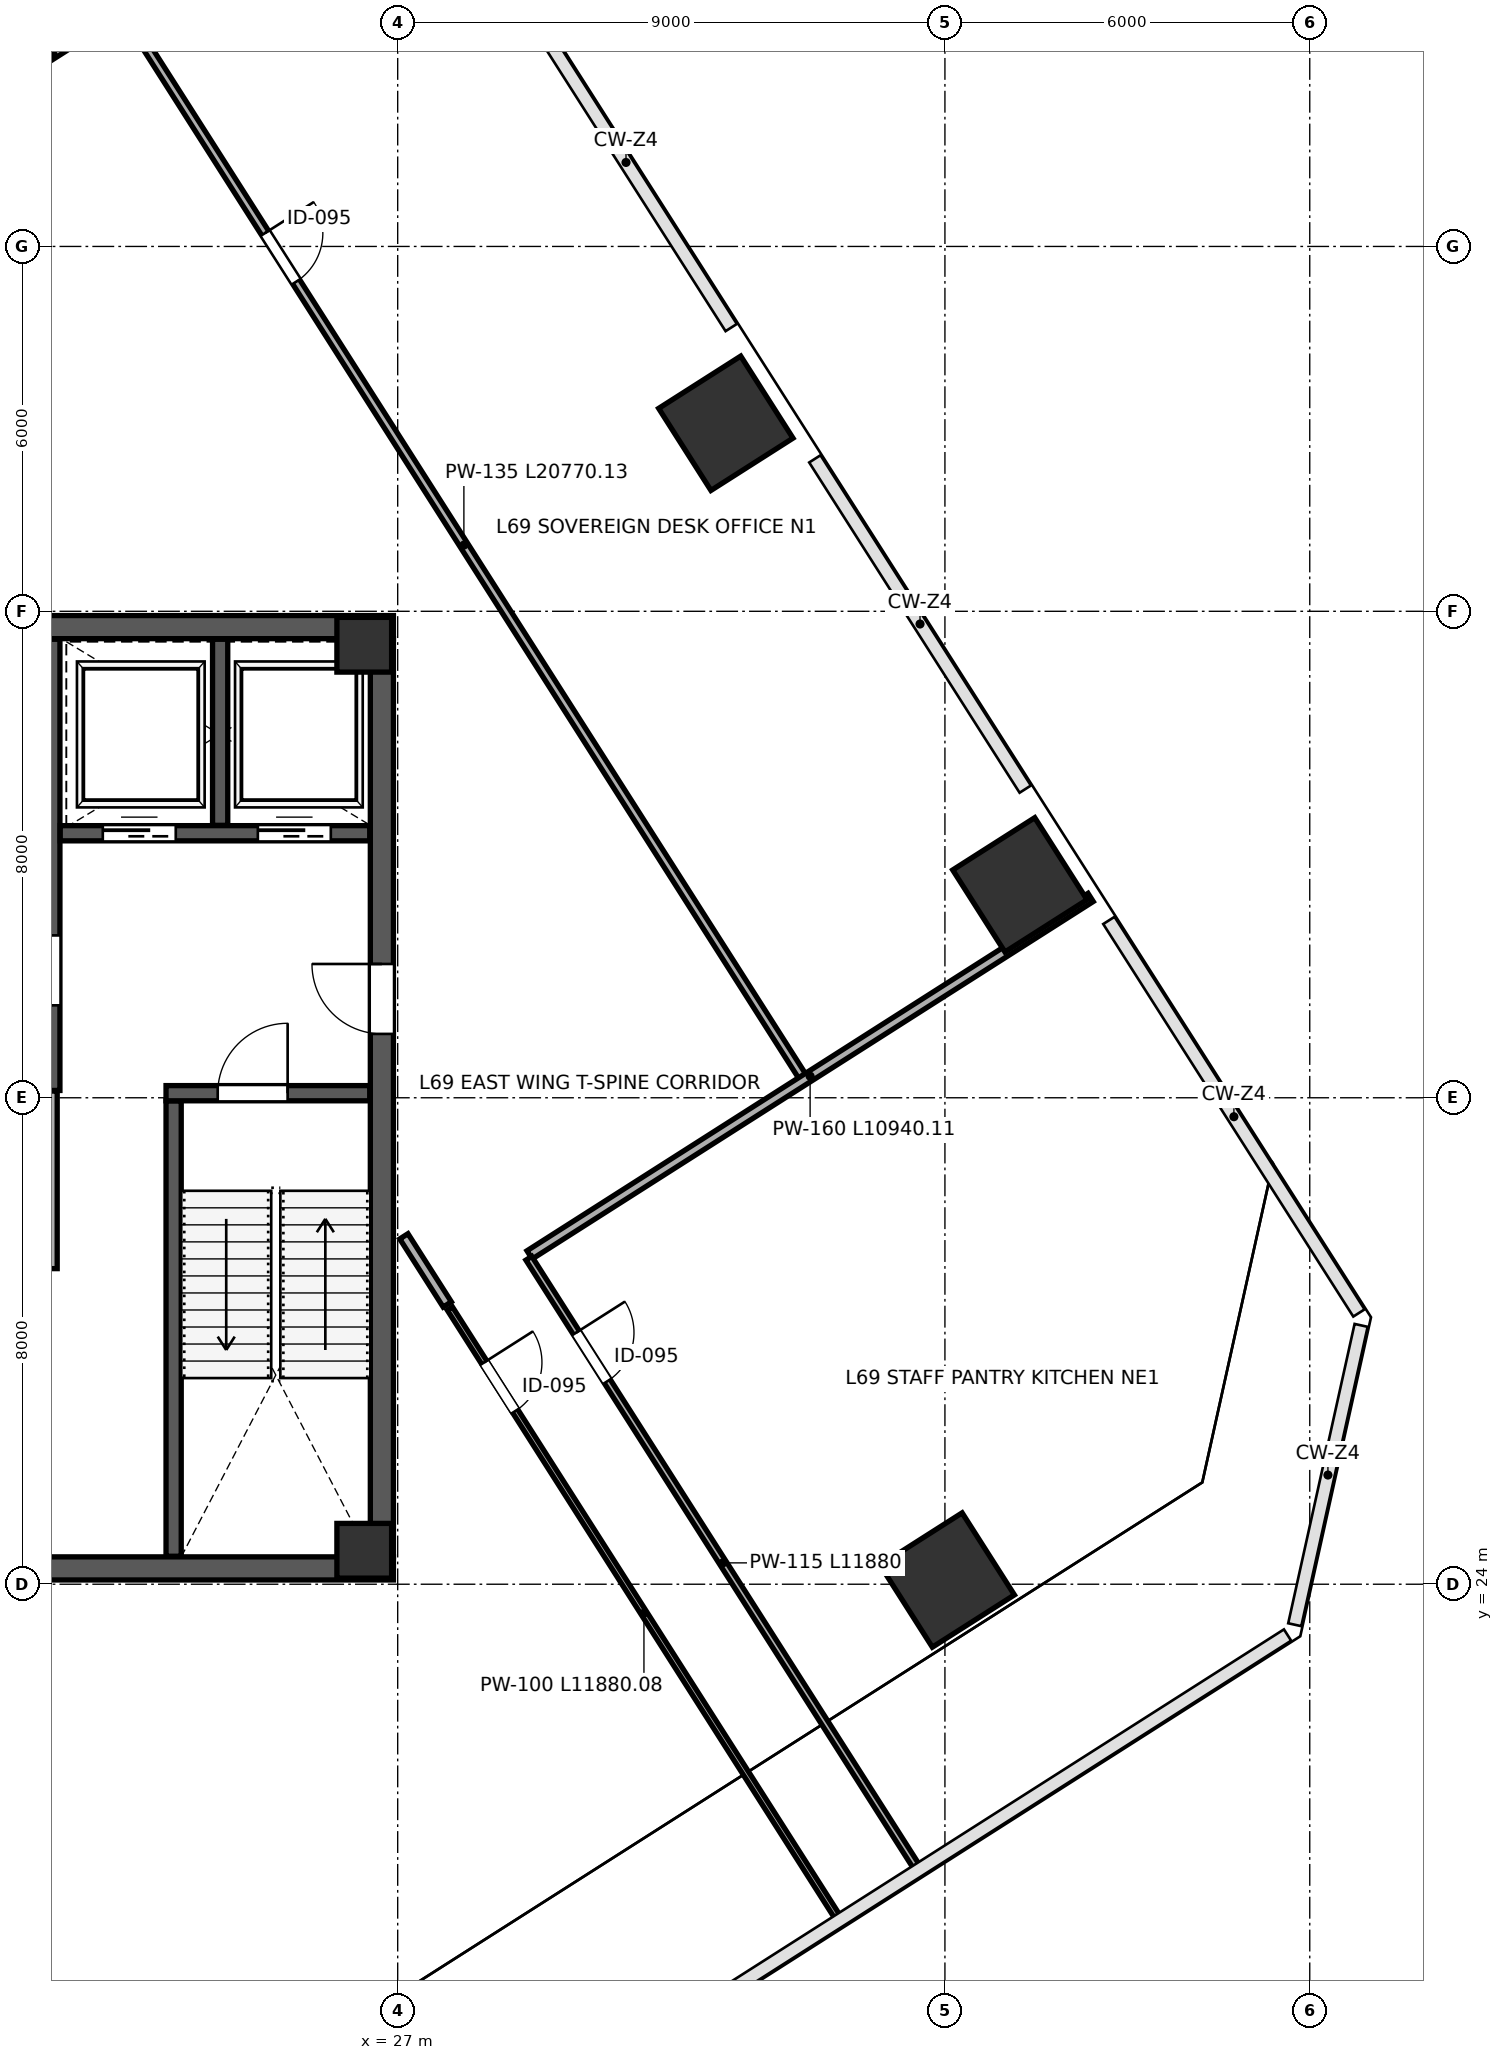
"""IFC4 building model, lengths in metres.
Left out: names, types, materials, properties, quantities, classifications, styles, units other than length and angle.
Written with IfcOpenShell. Run it as: python <this file> out.ifc"""

import sys

from ifc_helpers import new_model, si_unit, direction, frame, frame_2d, origin, origin_2d, place, context, subcontext, project, spatial, rectangle, extrude, source, transform, mapped, element, fill, save


model = new_model("IFC4")
c1 = context("Model", 3, precision=1e-05, world=origin(), true_north=direction((0.0, 1.0)))
c2 = subcontext(c1, "Body", "Model", "MODEL_VIEW")
j1 = project(units=[si_unit("LENGTHUNIT", "METRE"), si_unit("PLANEANGLEUNIT", "RADIAN")], contexts=[c1])
p1 = place(None, origin())
s1 = spatial("IfcSite", under=j1, at=p1, CompositionType="ELEMENT")
p2 = place(p1, origin())
s2 = spatial("IfcBuilding", under=s1, at=p2, CompositionType="ELEMENT")
p3 = place(p2, frame((0.0, 0.0, 307.2)))
s3 = spatial("IfcBuildingStorey", under=s2, at=p3, CompositionType="ELEMENT", Elevation=307.2)
m1 = source(origin(), c2, "Body", "SweptSolid", [
    extrude(rectangle(XDim=0.9, YDim=0.9, at=origin_2d()), origin(), (0.0, 0.0, 1.0), 4.198),
])
for number, where, z_axis, x_axis in (
    (1, (26.45, 24.55, 0.001), (0.0, 0.0, 1.0), (1.0, 0.0, 0.0)),
    (2, (26.45, 39.45, 0.001), (0.0, 0.0, 1.0), (1.0, 0.0, 0.0)),
):
    element("IfcColumn", number, at=place(p3, frame(where, z_axis=z_axis, x_axis=x_axis)), inside=s3, PredefinedType="COLUMN", context=c2, shape_type="MappedRepresentation", body=[
        mapped(m1, transform((0.0, 0.0, 0.0), scale=1.0)),
    ])
m2 = source(origin(), c2, "Body", "SweptSolid", [
    extrude(rectangle(XDim=1.6, YDim=1.6, at=origin_2d()), origin(), (0.0, 0.0, 1.0), 4.198),
])
for number, where, z_axis, x_axis in (
    (3, (32.397, 43.092, 0.001), (0.0, 0.0, 1.0), (-0.537, 0.843, 0.0)),
    (4, (37.232, 35.501, 0.001), (0.0, 0.0, 1.0), (-0.537, 0.843, 0.0)),
    (5, (36.038, 24.069, 0.001), (0.0, 0.0, 1.0), (-0.537, 0.843, 0.0)),
):
    element("IfcColumn", number, at=place(p3, frame(where, z_axis=z_axis, x_axis=x_axis)), inside=s3, PredefinedType="COLUMN", context=c2, shape_type="MappedRepresentation", body=[
        mapped(m2, transform((0.0, 0.0, 0.0), scale=1.0)),
    ])
p4 = place(p3, frame((26.74, 24.45, 0.0), z_axis=(0.0, 0.0, 1.0), x_axis=(0.0, 1.0, 0.0)))
e6 = element("IfcWall", 6, at=p4, inside=s3, PredefinedType="SHEAR", context=c2, shape_type="SweptSolid", body=[
    extrude(rectangle(XDim=15.1, YDim=0.38, at=frame_2d((7.55, 0.0))), origin(), (0.0, 0.0, 1.0), 3.96),
])
p5 = place(p4, frame((8.6, 0.0, 0.0)))
e7 = element("IfcOpeningElement", 7, at=p5, cuts=e6, PredefinedType="OPENING", context=c2, shape_type="SweptSolid", body=[
    extrude(rectangle(XDim=1.15, YDim=2.2, at=frame_2d((0.575, 1.1))), frame((0.0, 0.2, 0.0), z_axis=(0.0, -1.0, 0.0), x_axis=(1.0, 0.0, 0.0)), (0.0, 0.0, 1.0), 0.4),
])
for number, where, z_axis, x_axis in (
    (8, (9.07, 24.26, 0.0), (0.0, 0.0, 1.0), (1.0, 0.0, 0.0)),
    (9, (9.07, 39.74, 0.0), (0.0, 0.0, 1.0), (1.0, 0.0, 0.0)),
):
    element("IfcWall", number, at=place(p3, frame(where, z_axis=z_axis, x_axis=x_axis)), inside=s3, PredefinedType="SHEAR", context=c2, shape_type="SweptSolid", body=[
        extrude(rectangle(XDim=17.86, YDim=0.38, at=frame_2d((8.93, 0.0))), origin(), (0.0, 0.0, 1.0), 3.96),
    ])
p6 = place(p3, frame((23.315, 24.46, 0.0), z_axis=(0.0, 0.0, 1.0), x_axis=(0.0, 1.0, 0.0)))
e10 = element("IfcWall", 10, at=p6, inside=s3, PredefinedType="SHEAR", context=c2, shape_type="SweptSolid", body=[
    extrude(rectangle(XDim=7.49, YDim=0.25, at=frame_2d((3.745, 0.0))), origin(), (0.0, 0.0, 1.0), 3.96),
])
p7 = place(p3, frame((23.19, 32.075, 0.0), z_axis=(0.0, 0.0, 1.0), x_axis=(1.0, 0.0, 0.0)))
e11 = element("IfcWall", 11, at=p7, inside=s3, PredefinedType="SHEAR", context=c2, shape_type="SweptSolid", body=[
    extrude(rectangle(XDim=3.35, YDim=0.25, at=frame_2d((1.675, 0.0))), origin(), (0.0, 0.0, 1.0), 3.96),
])
p8 = place(p7, frame((0.85, 0.0, 0.0)))
e12 = element("IfcOpeningElement", 12, at=p8, cuts=e11, PredefinedType="OPENING", context=c2, shape_type="SweptSolid", body=[
    extrude(rectangle(XDim=1.15, YDim=2.2, at=frame_2d((0.575, 1.1))), frame((0.0, 0.135, 0.0), z_axis=(0.0, -1.0, 0.0), x_axis=(1.0, 0.0, 0.0)), (0.0, 0.0, 1.0), 0.27),
])
p9 = place(p3, frame((21.32, 32.12, 0.0), z_axis=(0.0, 0.0, 1.0), x_axis=(0.0, 1.0, 0.0)))
e13 = element("IfcWall", 13, at=p9, inside=s3, PredefinedType="SHEAR", context=c2, shape_type="SweptSolid", body=[
    extrude(rectangle(XDim=7.42, YDim=0.25, at=frame_2d((3.71, 0.0))), origin(), (0.0, 0.0, 1.0), 3.96),
])
p10 = place(p9, frame((1.4, 0.0, 0.0)))
e14 = element("IfcOpeningElement", 14, at=p10, cuts=e13, PredefinedType="OPENING", context=c2, shape_type="SweptSolid", body=[
    extrude(rectangle(XDim=1.15, YDim=2.2, at=frame_2d((0.575, 1.1))), frame((0.0, 0.135, 0.0), z_axis=(0.0, -1.0, 0.0), x_axis=(1.0, 0.0, 0.0)), (0.0, 0.0, 1.0), 0.27),
])
p11 = place(p3, frame((21.45, 36.35, 0.0), z_axis=(0.0, 0.0, 1.0), x_axis=(1.0, 0.0, 0.0)))
e15 = element("IfcWall", 15, at=p11, inside=s3, PredefinedType="SHEAR", context=c2, shape_type="SweptSolid", body=[
    extrude(rectangle(XDim=5.09, YDim=0.25, at=frame_2d((2.545, 0.0))), origin(), (0.0, 0.0, 1.0), 3.96),
])
p12 = place(p11, frame((0.7, 0.0, 0.0)))
e16 = element("IfcOpeningElement", 16, at=p12, cuts=e15, PredefinedType="OPENING", context=c2, shape_type="SweptSolid", body=[
    extrude(rectangle(XDim=1.2, YDim=2.2, at=frame_2d((0.6, 1.1))), frame((0.0, 0.135, 0.0), z_axis=(0.0, -1.0, 0.0), x_axis=(1.0, 0.0, 0.0)), (0.0, 0.0, 1.0), 0.27),
])
p13 = place(p11, frame((3.25, 0.0, 0.0)))
e17 = element("IfcOpeningElement", 17, at=p13, cuts=e15, PredefinedType="OPENING", context=c2, shape_type="SweptSolid", body=[
    extrude(rectangle(XDim=1.2, YDim=2.2, at=frame_2d((0.6, 1.1))), frame((0.0, 0.135, 0.0), z_axis=(0.0, -1.0, 0.0), x_axis=(1.0, 0.0, 0.0)), (0.0, 0.0, 1.0), 0.27),
])
p14 = place(p3, frame((24.08, 36.48, 0.0), z_axis=(0.0, 0.0, 1.0), x_axis=(0.0, 1.0, 0.0)))
e18 = element("IfcWall", 18, at=p14, inside=s3, PredefinedType="SHEAR", context=c2, shape_type="SweptSolid", body=[
    extrude(rectangle(XDim=3.06, YDim=0.25, at=frame_2d((1.53, 0.0))), origin(), (0.0, 0.0, 1.0), 3.96),
])
p15 = place(p3, frame((21.32, 29.19, 0.0), z_axis=(0.0, 0.0, 1.0), x_axis=(0.0, 1.0, 0.0)))
e19 = element("IfcWall", 19, at=p15, inside=s3, PredefinedType="PARTITIONING", context=c2, shape_type="SweptSolid", body=[
    extrude(rectangle(XDim=2.92, YDim=0.16, at=frame_2d((1.46, 0.0))), origin(), (0.0, 0.0, 1.0), 3.96),
])
p16 = place(p3, frame((27.102, 29.721, 0.0), z_axis=(0.0, 0.0, 1.0), x_axis=(0.537279676557, -0.843404143432, 0.0)))
e20 = element("IfcWall", 20, at=p16, inside=s3, PredefinedType="PARTITIONING", context=c2, shape_type="SweptSolid", body=[
    extrude(rectangle(XDim=1.329, YDim=0.16, at=frame_2d((0.664, 0.0))), origin(), (0.0, 0.0, 1.0), 3.96),
])
p17 = place(p3, frame((22.509, 49.847, 0.0), z_axis=(0.0, 0.0, 1.0), x_axis=(0.537290700932, -0.843397120396, 0.0)))
e21 = element("IfcWall", 21, at=p17, inside=s3, PredefinedType="PARTITIONING", context=c2, shape_type="SweptSolid", body=[
    extrude(rectangle(XDim=20.77, YDim=0.135, at=frame_2d((10.385, 0.0))), origin(), (0.0, 0.0, 1.0), 3.96),
])
p18 = place(p17, frame((4.3, 0.0, 0.0)))
e22 = element("IfcOpeningElement", 22, at=p18, cuts=e21, PredefinedType="OPENING", context=c2, shape_type="SweptSolid", body=[
    extrude(rectangle(XDim=0.95, YDim=2.15, at=frame_2d((0.475, 1.075))), frame((0.0, 0.078, 0.0), z_axis=(0.0, -1.0, 0.0), x_axis=(1.0, 0.0, 0.0)), (0.0, 0.0, 1.0), 0.155),
])
p19 = place(p3, frame((16.077, 45.797, 0.0), z_axis=(0.0, 0.0, 1.0), x_axis=(0.843392973199, 0.537297210824, 0.0)))
e23 = element("IfcWall", 23, at=p19, inside=s3, PredefinedType="PARTITIONING", context=c2, shape_type="SweptSolid", body=[
    extrude(rectangle(XDim=12.472, YDim=0.115, at=frame_2d((6.236, 0.0))), origin(), (0.0, 0.0, 1.0), 3.96),
])
p20 = place(p3, frame((29.169, 29.416, 0.0), z_axis=(0.0, 0.0, 1.0), x_axis=(0.843389386546, 0.537302840734, 0.0)))
e24 = element("IfcWall", 24, at=p20, inside=s3, PredefinedType="PARTITIONING", context=c2, shape_type="SweptSolid", body=[
    extrude(rectangle(XDim=10.94, YDim=0.16, at=frame_2d((5.47, 0.0))), origin(), (0.0, 0.0, 1.0), 3.96),
])
p21 = place(p3, frame((29.157, 29.361, 0.0), z_axis=(0.0, 0.0, 1.0), x_axis=(0.537294294715, -0.843394830946, 0.0)))
e25 = element("IfcWall", 25, at=p21, inside=s3, PredefinedType="PARTITIONING", context=c2, shape_type="SweptSolid", body=[
    extrude(rectangle(XDim=11.88, YDim=0.115, at=frame_2d((5.94, 0.0))), origin(), (0.0, 0.0, 1.0), 3.252),
])
p22 = place(p21, frame((1.45, 0.0, 0.0)))
e26 = element("IfcOpeningElement", 26, at=p22, cuts=e25, PredefinedType="OPENING", context=c2, shape_type="SweptSolid", body=[
    extrude(rectangle(XDim=0.95, YDim=2.15, at=frame_2d((0.475, 1.075))), frame((0.0, 0.067, 0.0), z_axis=(0.0, -1.0, 0.0), x_axis=(1.0, 0.0, 0.0)), (0.0, 0.0, 1.0), 0.135),
])
p23 = place(p3, frame((27.858, 28.533, 0.0), z_axis=(0.0, 0.0, 1.0), x_axis=(0.537294294715, -0.843394830946, 0.0)))
e27 = element("IfcWall", 27, at=p23, inside=s3, PredefinedType="PARTITIONING", context=c2, shape_type="SweptSolid", body=[
    extrude(rectangle(XDim=11.88, YDim=0.1, at=frame_2d((5.94, 0.0))), origin(), (0.0, 0.0, 1.0), 3.252),
])
p24 = place(p23, frame((1.05, 0.0, 0.0)))
e28 = element("IfcOpeningElement", 28, at=p24, cuts=e27, PredefinedType="OPENING", context=c2, shape_type="SweptSolid", body=[
    extrude(rectangle(XDim=0.95, YDim=2.15, at=frame_2d((0.475, 1.075))), frame((0.0, 0.06, 0.0), z_axis=(0.0, -1.0, 0.0), x_axis=(1.0, 0.0, 0.0)), (0.0, 0.0, 1.0), 0.12),
])
m3 = source(origin(), c2, "Body", "SweptSolid", [
    extrude(rectangle(XDim=1.15, YDim=2.2, at=frame_2d((0.575, 1.1))), frame((0.0, 0.025, 0.0), z_axis=(0.0, -1.0, 0.0), x_axis=(1.0, 0.0, 0.0)), (0.0, 0.0, 1.0), 0.05),
])
p25 = place(p10, origin())
e29 = element("IfcDoor", 29, at=p25, inside=s3, OperationType="SINGLE_SWING_LEFT", PredefinedType="DOOR", context=c2, shape_type="MappedRepresentation", body=[
    mapped(m3, transform((0.0, 0.0, 0.0), scale=1.0)),
])
fill(e14, e29)
m4 = source(origin(), c2, "Body", "SweptSolid", [
    extrude(rectangle(XDim=1.15, YDim=2.2, at=frame_2d((0.575, 1.1))), frame((0.0, 0.025, 0.0), z_axis=(0.0, -1.0, 0.0), x_axis=(1.0, 0.0, 0.0)), (0.0, 0.0, 1.0), 0.05),
])
p26 = place(p8, origin())
e30 = element("IfcDoor", 30, at=p26, inside=s3, OperationType="SINGLE_SWING_RIGHT", PredefinedType="DOOR", context=c2, shape_type="MappedRepresentation", body=[
    mapped(m4, transform((0.0, 0.0, 0.0), scale=1.0)),
])
fill(e12, e30)
p27 = place(p5, origin())
e31 = element("IfcDoor", 31, at=p27, inside=s3, OperationType="SINGLE_SWING_RIGHT", PredefinedType="DOOR", context=c2, shape_type="MappedRepresentation", body=[
    mapped(m3, transform((0.0, 0.0, 0.0), scale=1.0)),
])
fill(e7, e31)
m5 = source(origin(), c2, "Body", "SweptSolid", [
    extrude(rectangle(XDim=1.2, YDim=2.2, at=frame_2d((0.6, 1.1))), frame((0.0, 0.025, 0.0), z_axis=(0.0, -1.0, 0.0), x_axis=(1.0, 0.0, 0.0)), (0.0, 0.0, 1.0), 0.05),
])
p28 = place(p12, origin())
e32 = element("IfcDoor", 32, at=p28, inside=s3, OperationType="SLIDING_TO_LEFT", PredefinedType="DOOR", context=c2, shape_type="MappedRepresentation", body=[
    mapped(m5, transform((0.0, 0.0, 0.0), scale=1.0)),
])
fill(e16, e32)
p29 = place(p13, origin())
e33 = element("IfcDoor", 33, at=p29, inside=s3, OperationType="SLIDING_TO_RIGHT", PredefinedType="DOOR", context=c2, shape_type="MappedRepresentation", body=[
    mapped(m5, transform((0.0, 0.0, 0.0), scale=1.0)),
])
fill(e17, e33)
m6 = source(origin(), c2, "Body", "SweptSolid", [
    extrude(rectangle(XDim=0.95, YDim=2.15, at=frame_2d((0.475, 1.075))), frame((0.0, 0.025, 0.0), z_axis=(0.0, -1.0, 0.0), x_axis=(1.0, 0.0, 0.0)), (0.0, 0.0, 1.0), 0.05),
])
p30 = place(p18, origin())
e34 = element("IfcDoor", 34, at=p30, inside=s3, OperationType="SINGLE_SWING_LEFT", PredefinedType="DOOR", context=c2, shape_type="MappedRepresentation", body=[
    mapped(m6, transform((0.0, 0.0, 0.0), scale=1.0)),
])
fill(e22, e34)
p31 = place(p22, origin())
e35 = element("IfcDoor", 35, at=p31, inside=s3, OperationType="SINGLE_SWING_LEFT", PredefinedType="DOOR", context=c2, shape_type="MappedRepresentation", body=[
    mapped(m6, transform((0.0, 0.0, 0.0), scale=1.0)),
])
fill(e26, e35)
p32 = place(p24, origin())
e36 = element("IfcDoor", 36, at=p32, inside=s3, OperationType="SINGLE_SWING_LEFT", PredefinedType="DOOR", context=c2, shape_type="MappedRepresentation", body=[
    mapped(m6, transform((0.0, 0.0, 0.0), scale=1.0)),
])
fill(e28, e36)
save(model, sys.argv[1])
